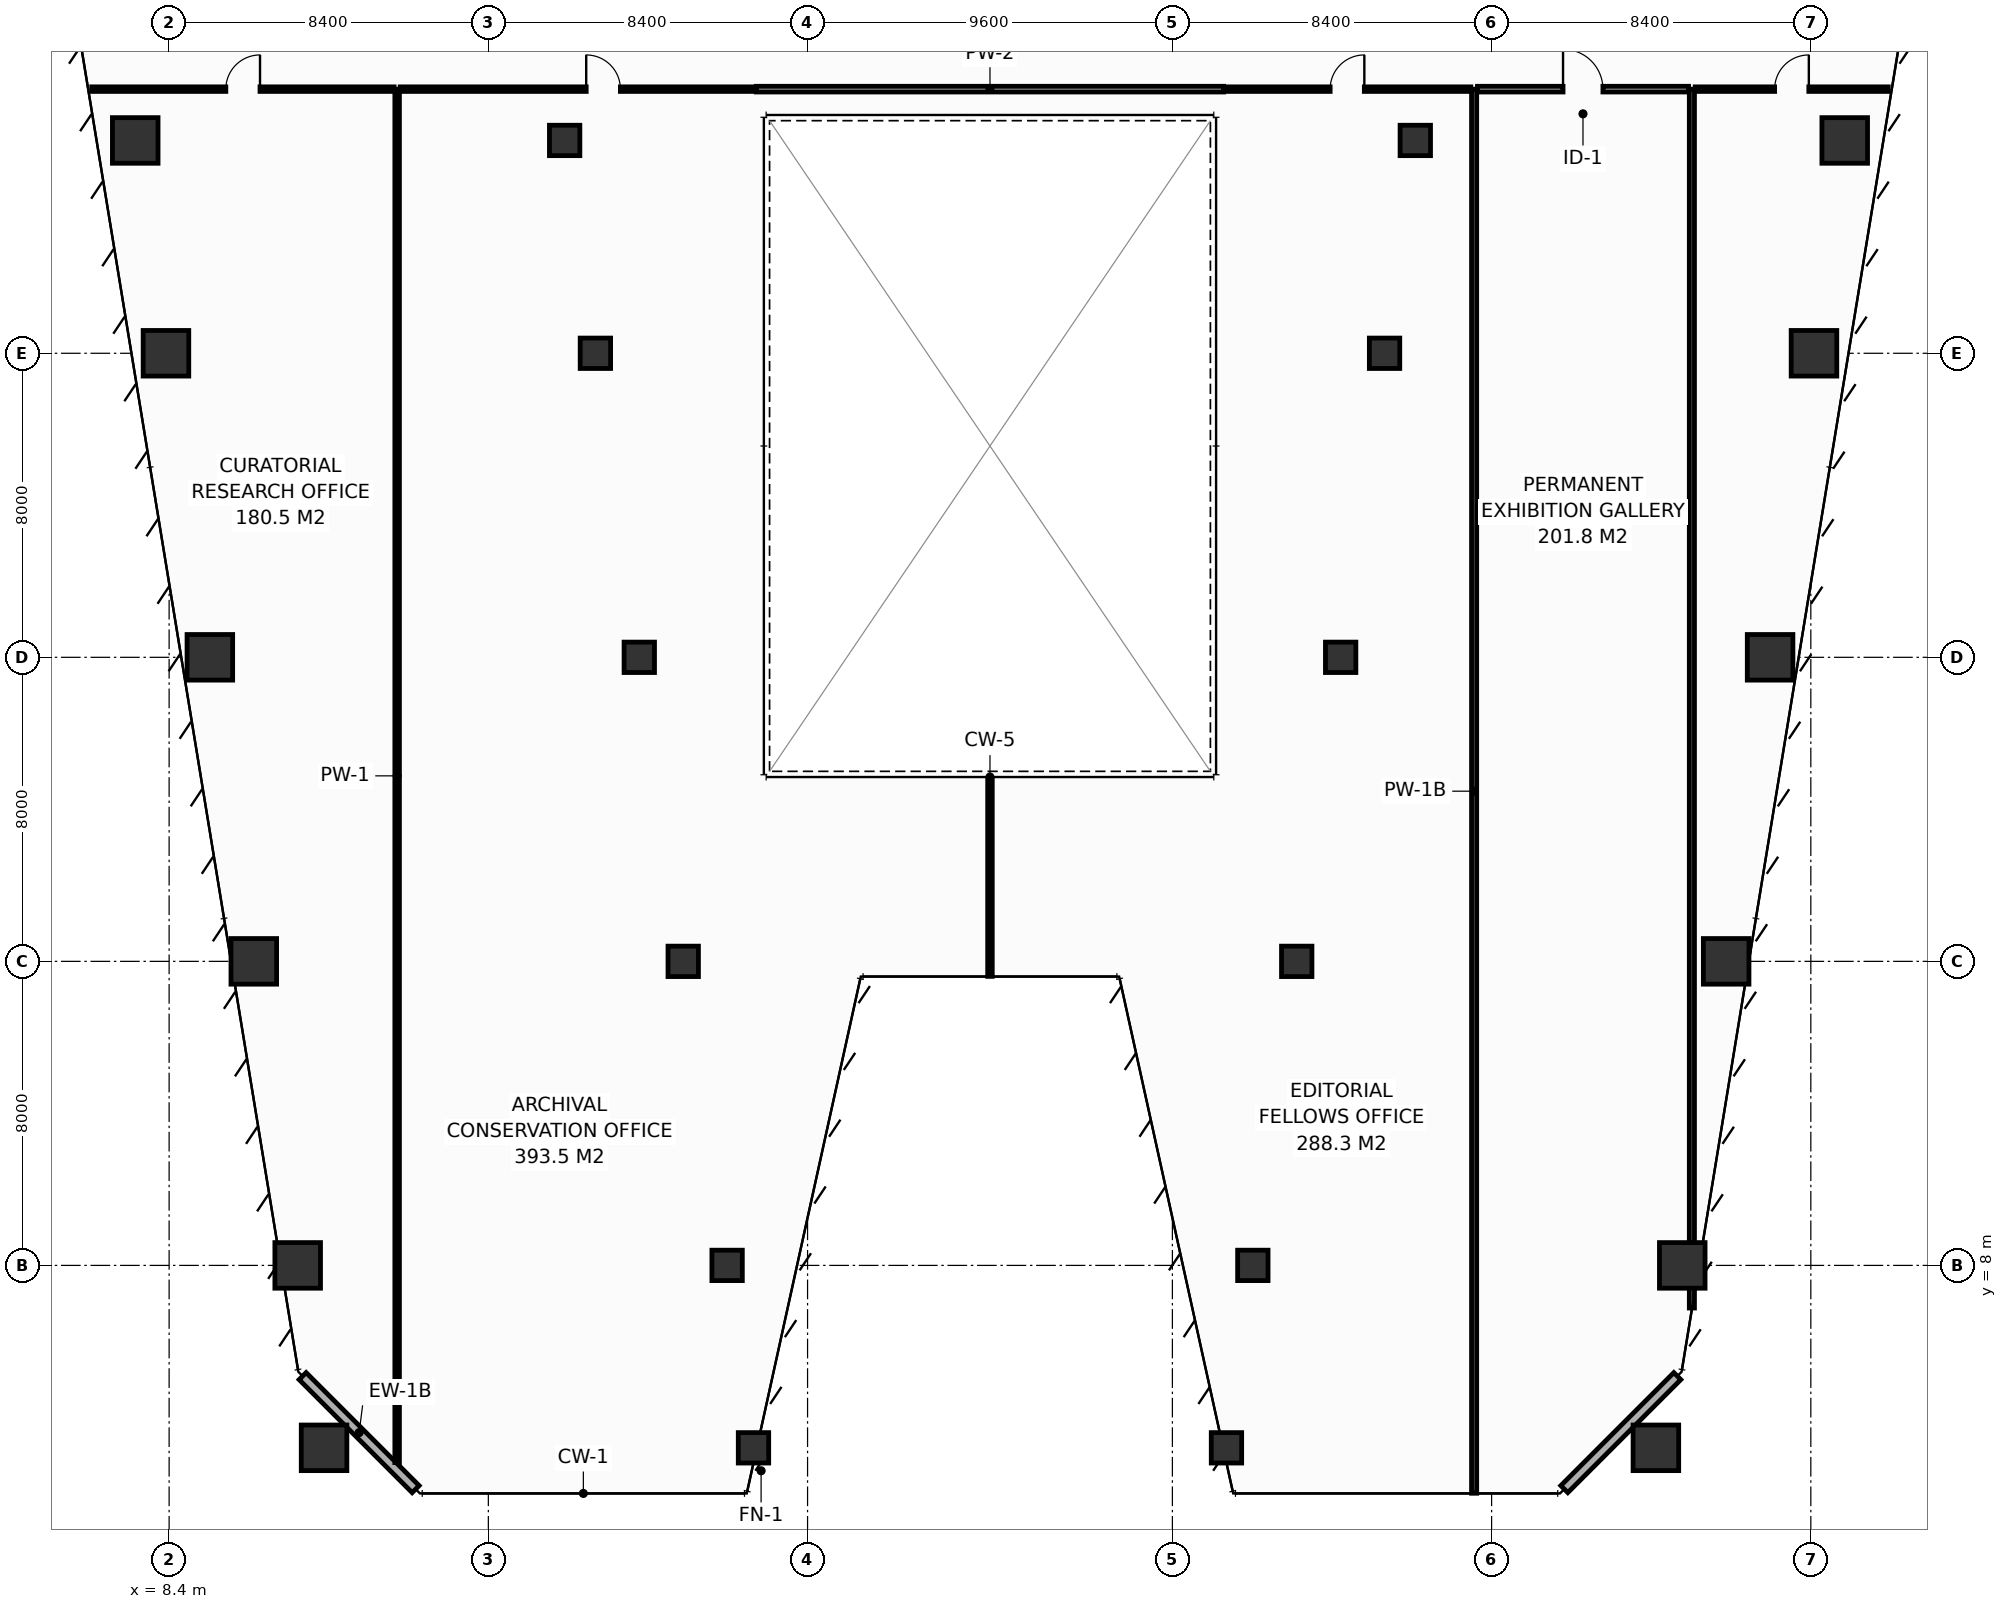
"""IFC4 building model, lengths in metres.
Left out: names, types, materials, properties, quantities, classifications, styles, units other than length and angle.
Written with IfcOpenShell. Run it as: python <this file> out.ifc"""

import sys

from ifc_helpers import new_model, si_unit, direction, frame, frame_2d, origin, origin_2d, place, context, subcontext, project, spatial, rectangle, hollow_rectangle, extrude, element, fill, save


model = new_model("IFC4")
c1 = context("Model", 3, precision=1e-05, world=origin(), true_north=direction((0.0, 1.0)))
c2 = subcontext(c1, "Body", "Model", "MODEL_VIEW")
j1 = project(units=[si_unit("LENGTHUNIT", "METRE"), si_unit("PLANEANGLEUNIT", "RADIAN")], contexts=[c1])
p1 = place(None, origin())
s1 = spatial("IfcSite", under=j1, at=p1, CompositionType="ELEMENT")
p2 = place(p1, origin())
s2 = spatial("IfcBuilding", under=s1, at=p2, CompositionType="ELEMENT")
p3 = place(p2, frame((0.0, 0.0, 38.4)))
s3 = spatial("IfcBuildingStorey", under=s2, at=p3, CompositionType="ELEMENT", Elevation=38.4)
for number, where, z_axis, x_axis in (
    (1, (12.477, 3.2, 0.0), (0.0, 0.0, 1.0), (1.0, 0.0, 0.0)),
    (2, (47.523, 3.2, 0.0), (0.0, 0.0, 1.0), (1.0, 0.0, 0.0)),
):
    element("IfcColumn", number, at=place(p3, frame(where, z_axis=z_axis, x_axis=x_axis)), inside=s3, PredefinedType="COLUMN", context=c2, shape_type="SweptSolid", body=[
        extrude(hollow_rectangle(XDim=1.2, YDim=1.2, WallThickness=0.055, at=origin_2d()), origin(), (0.0, 0.0, 1.0), 4.4),
    ])
for number, where, z_axis, x_axis in (
    (3, (23.777, 3.2, 0.0), (0.0, 0.0, 1.0), (1.0, 0.0, 0.0)),
    (4, (36.223, 3.2, 0.0), (0.0, 0.0, 1.0), (1.0, 0.0, 0.0)),
):
    element("IfcColumn", number, at=place(p3, frame(where, z_axis=z_axis, x_axis=x_axis)), inside=s3, PredefinedType="COLUMN", context=c2, shape_type="SweptSolid", body=[
        extrude(hollow_rectangle(XDim=0.8, YDim=0.8, WallThickness=0.036, at=origin_2d()), origin(), (0.0, 0.0, 1.0), 4.4),
    ])
for number, where, z_axis, x_axis in (
    (5, (11.783, 8.0, 0.0), (0.0, 0.0, 1.0), (1.0, 0.0, 0.0)),
    (6, (48.217, 8.0, 0.0), (0.0, 0.0, 1.0), (1.0, 0.0, 0.0)),
):
    element("IfcColumn", number, at=place(p3, frame(where, z_axis=z_axis, x_axis=x_axis)), inside=s3, PredefinedType="COLUMN", context=c2, shape_type="SweptSolid", body=[
        extrude(hollow_rectangle(XDim=1.2, YDim=1.2, WallThickness=0.055, at=origin_2d()), origin(), (0.0, 0.0, 1.0), 4.4),
    ])
for number, where, z_axis, x_axis in (
    (7, (23.083, 8.0, 0.0), (0.0, 0.0, 1.0), (1.0, 0.0, 0.0)),
    (8, (36.917, 8.0, 0.0), (0.0, 0.0, 1.0), (1.0, 0.0, 0.0)),
):
    element("IfcColumn", number, at=place(p3, frame(where, z_axis=z_axis, x_axis=x_axis)), inside=s3, PredefinedType="COLUMN", context=c2, shape_type="SweptSolid", body=[
        extrude(hollow_rectangle(XDim=0.8, YDim=0.8, WallThickness=0.036, at=origin_2d()), origin(), (0.0, 0.0, 1.0), 4.4),
    ])
for number, where, z_axis, x_axis in (
    (9, (10.628, 16.0, 0.0), (0.0, 0.0, 1.0), (1.0, 0.0, 0.0)),
    (10, (49.372, 16.0, 0.0), (0.0, 0.0, 1.0), (1.0, 0.0, 0.0)),
):
    element("IfcColumn", number, at=place(p3, frame(where, z_axis=z_axis, x_axis=x_axis)), inside=s3, PredefinedType="COLUMN", context=c2, shape_type="SweptSolid", body=[
        extrude(hollow_rectangle(XDim=1.2, YDim=1.2, WallThickness=0.055, at=origin_2d()), origin(), (0.0, 0.0, 1.0), 4.4),
    ])
for number, where, z_axis, x_axis in (
    (11, (21.928, 16.0, 0.0), (0.0, 0.0, 1.0), (1.0, 0.0, 0.0)),
    (12, (38.072, 16.0, 0.0), (0.0, 0.0, 1.0), (1.0, 0.0, 0.0)),
):
    element("IfcColumn", number, at=place(p3, frame(where, z_axis=z_axis, x_axis=x_axis)), inside=s3, PredefinedType="COLUMN", context=c2, shape_type="SweptSolid", body=[
        extrude(hollow_rectangle(XDim=0.8, YDim=0.8, WallThickness=0.036, at=origin_2d()), origin(), (0.0, 0.0, 1.0), 4.4),
    ])
for number, where, z_axis, x_axis in (
    (13, (9.472, 24.0, 0.0), (0.0, 0.0, 1.0), (1.0, 0.0, 0.0)),
    (14, (50.528, 24.0, 0.0), (0.0, 0.0, 1.0), (1.0, 0.0, 0.0)),
):
    element("IfcColumn", number, at=place(p3, frame(where, z_axis=z_axis, x_axis=x_axis)), inside=s3, PredefinedType="COLUMN", context=c2, shape_type="SweptSolid", body=[
        extrude(hollow_rectangle(XDim=1.2, YDim=1.2, WallThickness=0.055, at=origin_2d()), origin(), (0.0, 0.0, 1.0), 4.4),
    ])
for number, where, z_axis, x_axis in (
    (15, (20.772, 24.0, 0.0), (0.0, 0.0, 1.0), (1.0, 0.0, 0.0)),
    (16, (39.228, 24.0, 0.0), (0.0, 0.0, 1.0), (1.0, 0.0, 0.0)),
):
    element("IfcColumn", number, at=place(p3, frame(where, z_axis=z_axis, x_axis=x_axis)), inside=s3, PredefinedType="COLUMN", context=c2, shape_type="SweptSolid", body=[
        extrude(hollow_rectangle(XDim=0.8, YDim=0.8, WallThickness=0.036, at=origin_2d()), origin(), (0.0, 0.0, 1.0), 4.4),
    ])
for number, where, z_axis, x_axis in (
    (17, (8.317, 32.0, 0.0), (0.0, 0.0, 1.0), (1.0, 0.0, 0.0)),
    (18, (51.683, 32.0, 0.0), (0.0, 0.0, 1.0), (1.0, 0.0, 0.0)),
):
    element("IfcColumn", number, at=place(p3, frame(where, z_axis=z_axis, x_axis=x_axis)), inside=s3, PredefinedType="COLUMN", context=c2, shape_type="SweptSolid", body=[
        extrude(hollow_rectangle(XDim=1.2, YDim=1.2, WallThickness=0.055, at=origin_2d()), origin(), (0.0, 0.0, 1.0), 4.4),
    ])
for number, where, z_axis, x_axis in (
    (19, (19.617, 32.0, 0.0), (0.0, 0.0, 1.0), (1.0, 0.0, 0.0)),
    (20, (40.383, 32.0, 0.0), (0.0, 0.0, 1.0), (1.0, 0.0, 0.0)),
):
    element("IfcColumn", number, at=place(p3, frame(where, z_axis=z_axis, x_axis=x_axis)), inside=s3, PredefinedType="COLUMN", context=c2, shape_type="SweptSolid", body=[
        extrude(hollow_rectangle(XDim=0.8, YDim=0.8, WallThickness=0.036, at=origin_2d()), origin(), (0.0, 0.0, 1.0), 4.4),
    ])
for number, where, z_axis, x_axis in (
    (21, (7.508, 37.6, 0.0), (0.0, 0.0, 1.0), (1.0, 0.0, 0.0)),
    (22, (52.492, 37.6, 0.0), (0.0, 0.0, 1.0), (1.0, 0.0, 0.0)),
):
    element("IfcColumn", number, at=place(p3, frame(where, z_axis=z_axis, x_axis=x_axis)), inside=s3, PredefinedType="COLUMN", context=c2, shape_type="SweptSolid", body=[
        extrude(hollow_rectangle(XDim=1.2, YDim=1.2, WallThickness=0.055, at=origin_2d()), origin(), (0.0, 0.0, 1.0), 4.4),
    ])
for number, where, z_axis, x_axis in (
    (23, (18.808, 37.6, 0.0), (0.0, 0.0, 1.0), (1.0, 0.0, 0.0)),
    (24, (41.192, 37.6, 0.0), (0.0, 0.0, 1.0), (1.0, 0.0, 0.0)),
):
    element("IfcColumn", number, at=place(p3, frame(where, z_axis=z_axis, x_axis=x_axis)), inside=s3, PredefinedType="COLUMN", context=c2, shape_type="SweptSolid", body=[
        extrude(hollow_rectangle(XDim=0.8, YDim=0.8, WallThickness=0.036, at=origin_2d()), origin(), (0.0, 0.0, 1.0), 4.4),
    ])
for number, where, z_axis, x_axis in (
    (25, (11.913, 5.087, 0.0), (0.0, 0.0, 1.0), (0.707, -0.707, 0.0)),
    (26, (45.113, 2.113, 0.0), (0.0, 0.0, 1.0), (0.707, 0.707, 0.0)),
):
    element("IfcWall", number, at=place(p3, frame(where, z_axis=z_axis, x_axis=x_axis)), inside=s3, PredefinedType="STANDARD", context=c2, shape_type="SweptSolid", body=[
        extrude(rectangle(XDim=4.206, YDim=0.26, at=frame_2d((2.103, 0.0))), origin(), (0.0, 0.0, 1.0), 4.15),
    ])
p4 = place(p3, frame((14.4, 2.812, 0.0), z_axis=(0.0, 0.0, 1.0), x_axis=(0.0, 1.0, 0.0)))
e27 = element("IfcWall", 27, at=p4, inside=s3, PredefinedType="PARTITIONING", context=c2, shape_type="SweptSolid", body=[
    extrude(rectangle(XDim=36.138, YDim=0.12, at=frame_2d((18.069, 0.0))), origin(), (0.0, 0.0, 1.0), 3.335),
])
p5 = place(p3, frame((42.74, 2.005, 0.0), z_axis=(0.0, 0.0, 1.0), x_axis=(0.0, 1.0, 0.0)))
e28 = element("IfcWall", 28, at=p5, inside=s3, PredefinedType="PARTITIONING", context=c2, shape_type="SweptSolid", body=[
    extrude(rectangle(XDim=36.945, YDim=0.135, at=frame_2d((18.473, 0.0))), origin(), (0.0, 0.0, 1.0), 3.335),
])
p6 = place(p3, frame((48.47, 6.879, 0.0), z_axis=(0.0, 0.0, 1.0), x_axis=(0.0, 1.0, 0.0)))
e29 = element("IfcWall", 29, at=p6, inside=s3, PredefinedType="PARTITIONING", context=c2, shape_type="SweptSolid", body=[
    extrude(rectangle(XDim=32.071, YDim=0.135, at=frame_2d((16.036, 0.0))), origin(), (0.0, 0.0, 1.0), 3.335),
])
p7 = place(p3, frame((30.0, 15.605, 0.0), z_axis=(0.0, 0.0, 1.0), x_axis=(0.0, 1.0, 0.0)))
e30 = element("IfcWall", 30, at=p7, inside=s3, PredefinedType="PARTITIONING", context=c2, shape_type="SweptSolid", body=[
    extrude(rectangle(XDim=5.175, YDim=0.12, at=frame_2d((2.587, 0.0))), origin(), (0.0, 0.0, 1.0), 4.15),
])
p8 = place(p3, frame((6.363, 38.95, 0.0), z_axis=(0.0, 0.0, 1.0), x_axis=(1.0, 0.0, 0.0)))
e31 = element("IfcWall", 31, at=p8, inside=s3, PredefinedType="PARTITIONING", context=c2, shape_type="SweptSolid", body=[
    extrude(rectangle(XDim=7.957, YDim=0.12, at=frame_2d((3.979, 0.0))), origin(), (0.0, 0.0, 1.0), 3.635),
])
p9 = place(p8, frame((3.529, 0.0, 0.0)))
e32 = element("IfcOpeningElement", 32, at=p9, cuts=e31, PredefinedType="OPENING", context=c2, shape_type="SweptSolid", body=[
    extrude(rectangle(XDim=0.9, YDim=2.1, at=frame_2d((0.45, 1.05))), frame((0.0, 0.07, 0.0), z_axis=(0.0, -1.0, 0.0), x_axis=(1.0, 0.0, 0.0)), (0.0, 0.0, 1.0), 0.14),
])
p10 = place(p3, frame((14.48, 38.95, 0.0), z_axis=(0.0, 0.0, 1.0), x_axis=(1.0, 0.0, 0.0)))
e33 = element("IfcWall", 33, at=p10, inside=s3, PredefinedType="PARTITIONING", context=c2, shape_type="SweptSolid", body=[
    extrude(rectangle(XDim=9.37, YDim=0.12, at=frame_2d((4.685, 0.0))), origin(), (0.0, 0.0, 1.0), 3.335),
])
p11 = place(p10, frame((4.895, 0.0, 0.0)))
e34 = element("IfcOpeningElement", 34, at=p11, cuts=e33, PredefinedType="OPENING", context=c2, shape_type="SweptSolid", body=[
    extrude(rectangle(XDim=0.9, YDim=2.1, at=frame_2d((0.45, 1.05))), frame((0.0, 0.07, 0.0), z_axis=(0.0, -1.0, 0.0), x_axis=(1.0, 0.0, 0.0)), (0.0, 0.0, 1.0), 0.14),
])
p12 = place(p3, frame((23.85, 38.95, 0.0), z_axis=(0.0, 0.0, 1.0), x_axis=(1.0, 0.0, 0.0)))
e35 = element("IfcWall", 35, at=p12, inside=s3, PredefinedType="PARTITIONING", context=c2, shape_type="SweptSolid", body=[
    extrude(rectangle(XDim=12.3, YDim=0.15, at=frame_2d((6.15, 0.0))), origin(), (0.0, 0.0, 1.0), 4.15),
])
p13 = place(p3, frame((36.15, 38.95, 0.0), z_axis=(0.0, 0.0, 1.0), x_axis=(1.0, 0.0, 0.0)))
e36 = element("IfcWall", 36, at=p13, inside=s3, PredefinedType="PARTITIONING", context=c2, shape_type="SweptSolid", body=[
    extrude(rectangle(XDim=6.503, YDim=0.12, at=frame_2d((3.251, 0.0))), origin(), (0.0, 0.0, 1.0), 3.335),
])
p14 = place(p13, frame((2.801, 0.0, 0.0)))
e37 = element("IfcOpeningElement", 37, at=p14, cuts=e36, PredefinedType="OPENING", context=c2, shape_type="SweptSolid", body=[
    extrude(rectangle(XDim=0.9, YDim=2.1, at=frame_2d((0.45, 1.05))), frame((0.0, 0.07, 0.0), z_axis=(0.0, -1.0, 0.0), x_axis=(1.0, 0.0, 0.0)), (0.0, 0.0, 1.0), 0.14),
])
p15 = place(p3, frame((42.827, 38.95, 0.0), z_axis=(0.0, 0.0, 1.0), x_axis=(1.0, 0.0, 0.0)))
e38 = element("IfcWall", 38, at=p15, inside=s3, PredefinedType="PARTITIONING", context=c2, shape_type="SweptSolid", body=[
    extrude(rectangle(XDim=5.555, YDim=0.15, at=frame_2d((2.778, 0.0))), origin(), (0.0, 0.0, 1.0), 4.15),
])
p16 = place(p15, frame((2.252, 0.0, 0.0)))
e39 = element("IfcOpeningElement", 39, at=p16, cuts=e38, PredefinedType="OPENING", context=c2, shape_type="SweptSolid", body=[
    extrude(rectangle(XDim=1.05, YDim=2.15, at=frame_2d((0.525, 1.075))), frame((0.0, 0.085, 0.0), z_axis=(0.0, -1.0, 0.0), x_axis=(1.0, 0.0, 0.0)), (0.0, 0.0, 1.0), 0.17),
])
p17 = place(p3, frame((48.558, 38.95, 0.0), z_axis=(0.0, 0.0, 1.0), x_axis=(1.0, 0.0, 0.0)))
e40 = element("IfcWall", 40, at=p17, inside=s3, PredefinedType="PARTITIONING", context=c2, shape_type="SweptSolid", body=[
    extrude(rectangle(XDim=5.08, YDim=0.12, at=frame_2d((2.54, 0.0))), origin(), (0.0, 0.0, 1.0), 3.635),
])
p18 = place(p17, frame((2.09, 0.0, 0.0)))
e41 = element("IfcOpeningElement", 41, at=p18, cuts=e40, PredefinedType="OPENING", context=c2, shape_type="SweptSolid", body=[
    extrude(rectangle(XDim=0.9, YDim=2.1, at=frame_2d((0.45, 1.05))), frame((0.0, 0.07, 0.0), z_axis=(0.0, -1.0, 0.0), x_axis=(1.0, 0.0, 0.0)), (0.0, 0.0, 1.0), 0.14),
])
p19 = place(p9, origin())
e42 = element("IfcDoor", 42, at=p19, inside=s3, OperationType="SINGLE_SWING_RIGHT", PredefinedType="DOOR", context=c2, shape_type="SweptSolid", body=[
    extrude(rectangle(XDim=0.9, YDim=2.1, at=frame_2d((0.45, 1.05))), frame((0.0, 0.025, 0.0), z_axis=(0.0, -1.0, 0.0), x_axis=(1.0, 0.0, 0.0)), (0.0, 0.0, 1.0), 0.05),
])
fill(e32, e42)
p20 = place(p11, origin())
e43 = element("IfcDoor", 43, at=p20, inside=s3, OperationType="SINGLE_SWING_LEFT", PredefinedType="DOOR", context=c2, shape_type="SweptSolid", body=[
    extrude(rectangle(XDim=0.9, YDim=2.1, at=frame_2d((0.45, 1.05))), frame((0.0, 0.025, 0.0), z_axis=(0.0, -1.0, 0.0), x_axis=(1.0, 0.0, 0.0)), (0.0, 0.0, 1.0), 0.05),
])
fill(e34, e43)
p21 = place(p14, origin())
e44 = element("IfcDoor", 44, at=p21, inside=s3, OperationType="SINGLE_SWING_RIGHT", PredefinedType="DOOR", context=c2, shape_type="SweptSolid", body=[
    extrude(rectangle(XDim=0.9, YDim=2.1, at=frame_2d((0.45, 1.05))), frame((0.0, 0.025, 0.0), z_axis=(0.0, -1.0, 0.0), x_axis=(1.0, 0.0, 0.0)), (0.0, 0.0, 1.0), 0.05),
])
fill(e37, e44)
p22 = place(p16, origin())
e45 = element("IfcDoor", 45, at=p22, inside=s3, OperationType="SINGLE_SWING_LEFT", PredefinedType="DOOR", context=c2, shape_type="SweptSolid", body=[
    extrude(rectangle(XDim=1.05, YDim=2.15, at=frame_2d((0.525, 1.075))), frame((0.0, 0.025, 0.0), z_axis=(0.0, -1.0, 0.0), x_axis=(1.0, 0.0, 0.0)), (0.0, 0.0, 1.0), 0.05),
])
fill(e39, e45)
p23 = place(p18, origin())
e46 = element("IfcDoor", 46, at=p23, inside=s3, OperationType="SINGLE_SWING_RIGHT", PredefinedType="DOOR", context=c2, shape_type="SweptSolid", body=[
    extrude(rectangle(XDim=0.9, YDim=2.1, at=frame_2d((0.45, 1.05))), frame((0.0, 0.025, 0.0), z_axis=(0.0, -1.0, 0.0), x_axis=(1.0, 0.0, 0.0)), (0.0, 0.0, 1.0), 0.05),
])
fill(e41, e46)
save(model, sys.argv[1])
